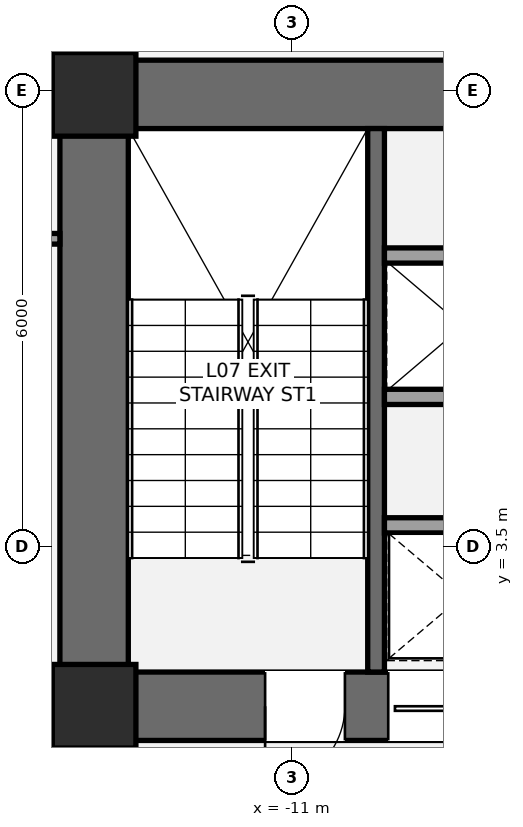
"""IFC4 building model, lengths in metres.
Left out: names, types, materials, properties, quantities, classifications, styles, units other than length and angle.
Written with IfcOpenShell. Run it as: python <this file> out.ifc"""

import sys

from ifc_helpers import new_model, si_unit, direction, frame, frame_2d, origin, origin_2d, place, context, subcontext, project, spatial, rectangle, extrude, element, fill, save


model = new_model("IFC4")
c1 = context("Model", 3, precision=1e-05, world=origin(), true_north=direction((0.0, 1.0)))
c2 = subcontext(c1, "Body", "Model", "MODEL_VIEW")
j1 = project(units=[si_unit("LENGTHUNIT", "METRE"), si_unit("PLANEANGLEUNIT", "RADIAN")], contexts=[c1])
p1 = place(None, origin())
s1 = spatial("IfcSite", under=j1, at=p1, CompositionType="ELEMENT")
p2 = place(p1, origin())
s2 = spatial("IfcBuilding", under=s1, at=p2, CompositionType="ELEMENT")
p3 = place(p2, frame((0.0, 0.0, 30.6)))
s3 = spatial("IfcBuildingStorey", under=s2, at=p3, CompositionType="ELEMENT", Elevation=30.6)
p4 = place(p3, frame((-13.6, 0.95, 0.0), z_axis=(0.0, 0.0, 1.0), x_axis=(0.0, 1.0, 0.0)))
e1 = element("IfcWall", 1, at=p4, inside=s3, PredefinedType="SHEAR", context=c2, shape_type="SweptSolid", body=[
    extrude(rectangle(XDim=8.95, YDim=0.9, at=frame_2d((4.475, 0.0))), origin(), (0.0, 0.0, 1.0), 3.6),
])
p5 = place(p3, frame((-14.05, 9.45, 0.0), z_axis=(0.0, 0.0, 1.0), x_axis=(1.0, 0.0, 0.0)))
e2 = element("IfcWall", 2, at=p5, inside=s3, PredefinedType="SHEAR", context=c2, shape_type="SweptSolid", body=[
    extrude(rectangle(XDim=9.7, YDim=0.9, at=frame_2d((4.85, 0.0))), origin(), (0.0, 0.0, 1.0), 3.6),
])
p6 = place(p3, frame((-4.75, 1.4, 0.0), z_axis=(0.0, 0.0, 1.0), x_axis=(-1.0, 0.0, 0.0)))
e3 = element("IfcWall", 3, at=p6, inside=s3, PredefinedType="SHEAR", context=c2, shape_type="SweptSolid", body=[
    extrude(rectangle(XDim=9.3, YDim=0.9, at=frame_2d((4.65, 0.0))), origin(), (0.0, 0.0, 1.0), 3.6),
])
p7 = place(p6, frame((5.55, 0.0, 0.0)))
e4 = element("IfcOpeningElement", 4, at=p7, cuts=e3, PredefinedType="OPENING", context=c2, shape_type="SweptSolid", body=[
    extrude(rectangle(XDim=1.05, YDim=2.15, at=frame_2d((0.525, 1.075))), frame((0.0, 0.46, 0.0), z_axis=(0.0, -1.0, 0.0), x_axis=(1.0, 0.0, 0.0)), (0.0, 0.0, 1.0), 0.92),
])
p8 = place(p6, frame((3.88, 0.0, 0.0)))
e5 = element("IfcOpeningElement", 5, at=p8, cuts=e3, PredefinedType="OPENING", context=c2, shape_type="SweptSolid", body=[
    extrude(rectangle(XDim=1.1, YDim=2.2, at=frame_2d((0.55, 1.1))), frame((0.0, 0.46, 0.0), z_axis=(0.0, -1.0, 0.0), x_axis=(1.0, 0.0, 0.0)), (0.0, 0.0, 1.0), 0.92),
])
p9 = place(p3, frame((-9.89, 1.85, 0.0), z_axis=(0.0, 0.0, 1.0), x_axis=(0.0, 1.0, 0.0)))
e6 = element("IfcWall", 6, at=p9, inside=s3, PredefinedType="SHEAR", context=c2, shape_type="SweptSolid", body=[
    extrude(rectangle(XDim=7.15, YDim=0.22, at=frame_2d((3.575, 0.0))), origin(), (0.0, 0.0, 1.0), 3.6),
])
for number, where, z_axis, x_axis in (
    (7, (-13.6, 1.4, 0.0), (0.0, 0.0, 1.0), (1.0, 0.0, 0.0)),
    (8, (-13.6, 9.45, 0.0), (0.0, 0.0, 1.0), (1.0, 0.0, 0.0)),
):
    element("IfcColumn", number, at=place(p3, frame(where, z_axis=z_axis, x_axis=x_axis)), inside=s3, PredefinedType="COLUMN", context=c2, shape_type="SweptSolid", body=[
        extrude(rectangle(XDim=1.1, YDim=1.1, at=origin_2d()), origin(), (0.0, 0.0, 1.0), 3.6),
    ])
p10 = place(p3, frame((-13.45, -2.15, 0.0), z_axis=(0.0, 0.0, 1.0), x_axis=(0.0, 1.0, 0.0)))
e9 = element("IfcWall", 9, at=p10, inside=s3, PredefinedType="PARTITIONING", context=c2, shape_type="SweptSolid", body=[
    extrude(rectangle(XDim=3.15, YDim=0.165, at=frame_2d((1.575, 0.0))), origin(), (0.0, 0.0, 1.0), 2.853),
])
p11 = place(p10, frame((1.15, 0.0, 0.0)))
e10 = element("IfcOpeningElement", 10, at=p11, cuts=e9, PredefinedType="OPENING", context=c2, shape_type="SweptSolid", body=[
    extrude(rectangle(XDim=1.05, YDim=2.15, at=frame_2d((0.525, 1.075))), frame((0.0, 0.093, 0.0), z_axis=(0.0, -1.0, 0.0), x_axis=(1.0, 0.0, 0.0)), (0.0, 0.0, 1.0), 0.185),
])
for number, where, z_axis, x_axis in (
    (11, (-9.78, 3.78, 0.0), (0.0, 0.0, 1.0), (1.0, 0.0, 0.0)),
    (12, (-9.78, 5.47, 0.0), (0.0, 0.0, 1.0), (1.0, 0.0, 0.0)),
    (13, (-9.78, 7.33, 0.0), (0.0, 0.0, 1.0), (1.0, 0.0, 0.0)),
):
    element("IfcWall", number, at=place(p3, frame(where, z_axis=z_axis, x_axis=x_axis)), inside=s3, PredefinedType="SOLIDWALL", context=c2, shape_type="SweptSolid", body=[
        extrude(rectangle(XDim=4.13, YDim=0.2, at=frame_2d((2.065, 0.0))), origin(), (0.0, 0.0, 1.0), 3.4),
    ])
p12 = place(p3, frame((-23.463, 7.55, 0.0), z_axis=(0.0, 0.0, 1.0), x_axis=(1.0, 0.0, 0.0)))
e14 = element("IfcWall", 14, at=p12, inside=s3, PredefinedType="PARTITIONING", context=c2, shape_type="SweptSolid", body=[
    extrude(rectangle(XDim=9.413, YDim=0.14, at=frame_2d((4.707, 0.0))), origin(), (0.0, 0.0, 1.0), 3.4),
])
p13 = place(p12, frame((1.984, 0.0, 0.0)))
e15 = element("IfcOpeningElement", 15, at=p13, cuts=e14, PredefinedType="OPENING", context=c2, shape_type="SweptSolid", body=[
    extrude(rectangle(XDim=0.92, YDim=2.15, at=frame_2d((0.46, 1.075))), frame((0.0, 0.08, 0.0), z_axis=(0.0, -1.0, 0.0), x_axis=(1.0, 0.0, 0.0)), (0.0, 0.0, 1.0), 0.16),
])
p14 = place(p7, origin())
e16 = element("IfcDoor", 16, at=p14, inside=s3, OperationType="SINGLE_SWING_RIGHT", PredefinedType="DOOR", context=c2, shape_type="SweptSolid", body=[
    extrude(rectangle(XDim=1.05, YDim=2.15, at=frame_2d((0.525, 1.075))), frame((0.0, 0.025, 0.0), z_axis=(0.0, -1.0, 0.0), x_axis=(1.0, 0.0, 0.0)), (0.0, 0.0, 1.0), 0.05),
])
fill(e4, e16)
p15 = place(p8, origin())
e17 = element("IfcDoor", 17, at=p15, inside=s3, OperationType="SLIDING_TO_LEFT", PredefinedType="DOOR", context=c2, shape_type="SweptSolid", body=[
    extrude(rectangle(XDim=1.1, YDim=2.2, at=frame_2d((0.55, 1.1))), frame((0.0, 0.025, 0.0), z_axis=(0.0, -1.0, 0.0), x_axis=(1.0, 0.0, 0.0)), (0.0, 0.0, 1.0), 0.05),
])
fill(e5, e17)
save(model, sys.argv[1])
